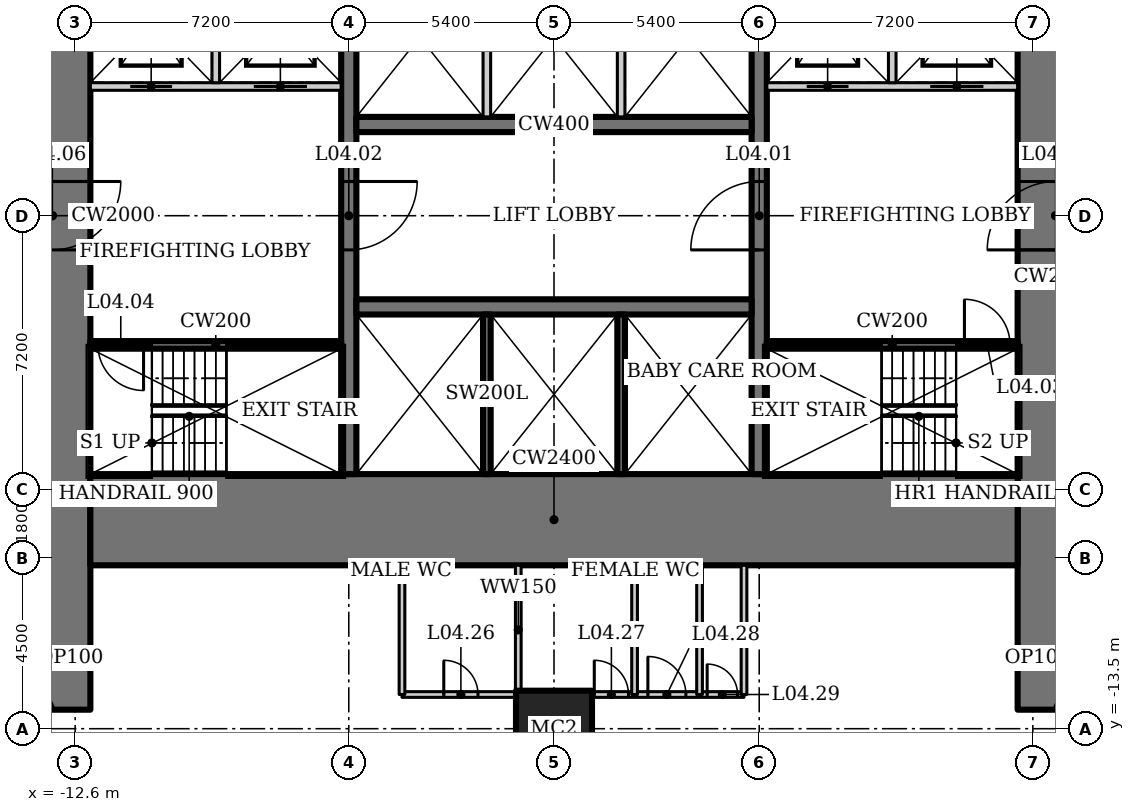
"""IFC4 building model, lengths in metres.
Left out: names, types, materials, properties, quantities, classifications, styles, units other than length and angle.
Written with IfcOpenShell. Run it as: python <this file> out.ifc"""

import sys

from ifc_helpers import new_model, si_unit, direction, frame, frame_2d, origin, origin_2d, place, context, subcontext, project, spatial, rectangle, hollow_rectangle, extrude, element, fill, save


model = new_model("IFC4")
c1 = context("Model", 3, precision=1e-05, world=origin(), true_north=direction((0.0, 1.0)))
c2 = subcontext(c1, "Body", "Model", "MODEL_VIEW")
j1 = project(units=[si_unit("LENGTHUNIT", "METRE"), si_unit("PLANEANGLEUNIT", "RADIAN")], contexts=[c1])
p1 = place(None, origin())
s1 = spatial("IfcSite", under=j1, at=p1, CompositionType="ELEMENT")
p2 = place(p1, origin())
s2 = spatial("IfcBuilding", under=s1, at=p2, CompositionType="ELEMENT")
p3 = place(p2, frame((0.0, 0.0, 27.0)))
s3 = spatial("IfcBuildingStorey", under=s2, at=p3, CompositionType="ELEMENT", Elevation=27.0)
p4 = place(p3, frame((0.0, -13.5, 0.0), z_axis=(0.0, 0.0, 1.0), x_axis=(1.0, 0.0, 0.0)))
e1 = element("IfcColumn", 1, at=p4, inside=s3, PredefinedType="COLUMN", context=c2, shape_type="SweptSolid", body=[
    extrude(hollow_rectangle(XDim=2.0, YDim=2.0, WallThickness=0.17, at=origin_2d()), origin(), (0.0, 0.0, 1.0), 5.0),
])
p5 = place(p3, frame((13.2, -13.0, 0.0), z_axis=(0.0, 0.0, 1.0), x_axis=(0.0, 1.0, 0.0)))
e2 = element("IfcWall", 2, at=p5, inside=s3, PredefinedType="SHEAR", context=c2, shape_type="SweptSolid", body=[
    extrude(rectangle(XDim=26.0, YDim=2.0, at=frame_2d((13.0, 0.0))), origin(), (0.0, 0.0, 1.0), 5.0),
])
p6 = place(p5, frame((12.1, 0.0, 0.0)))
e3 = element("IfcOpeningElement", 3, at=p6, cuts=e2, PredefinedType="OPENING", context=c2, shape_type="SweptSolid", body=[
    extrude(rectangle(XDim=1.8, YDim=2.1, at=frame_2d((0.9, 1.05))), frame((0.0, 1.01, 0.0), z_axis=(0.0, -1.0, 0.0), x_axis=(1.0, 0.0, 0.0)), (0.0, 0.0, 1.0), 2.02),
])
p7 = place(p3, frame((-13.2, 13.0, 0.0), z_axis=(0.0, 0.0, 1.0), x_axis=(0.0, -1.0, 0.0)))
e4 = element("IfcWall", 4, at=p7, inside=s3, PredefinedType="SHEAR", context=c2, shape_type="SweptSolid", body=[
    extrude(rectangle(XDim=26.0, YDim=2.0, at=frame_2d((13.0, 0.0))), origin(), (0.0, 0.0, 1.0), 5.0),
])
p8 = place(p7, frame((12.1, 0.0, 0.0)))
e5 = element("IfcOpeningElement", 5, at=p8, cuts=e4, PredefinedType="OPENING", context=c2, shape_type="SweptSolid", body=[
    extrude(rectangle(XDim=1.8, YDim=2.1, at=frame_2d((0.9, 1.05))), frame((0.0, 1.01, 0.0), z_axis=(0.0, -1.0, 0.0), x_axis=(1.0, 0.0, 0.0)), (0.0, 0.0, 1.0), 2.02),
])
p9 = place(p3, frame((-12.2, -8.0, 0.0), z_axis=(0.0, 0.0, 1.0), x_axis=(1.0, 0.0, 0.0)))
e6 = element("IfcWall", 6, at=p9, inside=s3, PredefinedType="SHEAR", context=c2, shape_type="SweptSolid", body=[
    extrude(rectangle(XDim=24.4, YDim=2.4, at=frame_2d((12.2, 0.0))), origin(), (0.0, 0.0, 1.0), 5.0),
])
p10 = place(p3, frame((5.4, -6.8, 0.0), z_axis=(0.0, 0.0, 1.0), x_axis=(0.0, 1.0, 0.0)))
e7 = element("IfcWall", 7, at=p10, inside=s3, PredefinedType="SHEAR", context=c2, shape_type="SweptSolid", body=[
    extrude(rectangle(XDim=13.6, YDim=0.4, at=frame_2d((6.8, 0.0))), origin(), (0.0, 0.0, 1.0), 5.0),
])
p11 = place(p10, frame((5.9, 0.0, 0.0)))
e8 = element("IfcOpeningElement", 8, at=p11, cuts=e7, PredefinedType="OPENING", context=c2, shape_type="SweptSolid", body=[
    extrude(rectangle(XDim=1.8, YDim=2.1, at=frame_2d((0.9, 1.05))), frame((0.0, 0.21, 0.0), z_axis=(0.0, -1.0, 0.0), x_axis=(1.0, 0.0, 0.0)), (0.0, 0.0, 1.0), 0.42),
])
p12 = place(p3, frame((-5.4, 6.8, 0.0), z_axis=(0.0, 0.0, 1.0), x_axis=(0.0, -1.0, 0.0)))
e9 = element("IfcWall", 9, at=p12, inside=s3, PredefinedType="SHEAR", context=c2, shape_type="SweptSolid", body=[
    extrude(rectangle(XDim=13.6, YDim=0.4, at=frame_2d((6.8, 0.0))), origin(), (0.0, 0.0, 1.0), 5.0),
])
p13 = place(p12, frame((5.9, 0.0, 0.0)))
e10 = element("IfcOpeningElement", 10, at=p13, cuts=e9, PredefinedType="OPENING", context=c2, shape_type="SweptSolid", body=[
    extrude(rectangle(XDim=1.8, YDim=2.1, at=frame_2d((0.9, 1.05))), frame((0.0, 0.21, 0.0), z_axis=(0.0, -1.0, 0.0), x_axis=(1.0, 0.0, 0.0)), (0.0, 0.0, 1.0), 0.42),
])
p14 = place(p3, frame((-5.2, -2.4, 0.0), z_axis=(0.0, 0.0, 1.0), x_axis=(1.0, 0.0, 0.0)))
e11 = element("IfcWall", 11, at=p14, inside=s3, PredefinedType="SHEAR", context=c2, shape_type="SweptSolid", body=[
    extrude(rectangle(XDim=10.4, YDim=0.4, at=frame_2d((5.2, 0.0))), origin(), (0.0, 0.0, 1.0), 5.0),
])
for number, where, z_axis, x_axis in (
    (12, (-1.767, -2.6, 0.0), (0.0, 0.0, 1.0), (0.0, -1.0, 0.0)),
    (13, (1.767, -2.6, 0.0), (0.0, 0.0, 1.0), (0.0, -1.0, 0.0)),
):
    element("IfcWall", number, at=place(p3, frame(where, z_axis=z_axis, x_axis=x_axis)), inside=s3, PredefinedType="SOLIDWALL", context=c2, shape_type="SweptSolid", body=[
        extrude(rectangle(XDim=4.2, YDim=0.2, at=frame_2d((2.1, 0.0))), origin(), (0.0, 0.0, 1.0), 5.0),
    ])
p15 = place(p3, frame((5.2, 2.4, 0.0), z_axis=(0.0, 0.0, 1.0), x_axis=(-1.0, 0.0, 0.0)))
e14 = element("IfcWall", 14, at=p15, inside=s3, PredefinedType="SHEAR", context=c2, shape_type="SweptSolid", body=[
    extrude(rectangle(XDim=10.4, YDim=0.4, at=frame_2d((5.2, 0.0))), origin(), (0.0, 0.0, 1.0), 5.0),
])
for number, where, z_axis, x_axis in (
    (15, (-1.767, 2.6, 0.0), (0.0, 0.0, 1.0), (0.0, 1.0, 0.0)),
    (16, (1.767, 2.6, 0.0), (0.0, 0.0, 1.0), (0.0, 1.0, 0.0)),
):
    element("IfcWall", number, at=place(p3, frame(where, z_axis=z_axis, x_axis=x_axis)), inside=s3, PredefinedType="SOLIDWALL", context=c2, shape_type="SweptSolid", body=[
        extrude(rectangle(XDim=4.2, YDim=0.2, at=frame_2d((2.1, 0.0))), origin(), (0.0, 0.0, 1.0), 5.0),
    ])
p16 = place(p3, frame((5.6, -3.4, 0.0), z_axis=(0.0, 0.0, 1.0), x_axis=(1.0, 0.0, 0.0)))
e17 = element("IfcWall", 17, at=p16, inside=s3, PredefinedType="SHEAR", context=c2, shape_type="SweptSolid", body=[
    extrude(rectangle(XDim=6.6, YDim=0.2, at=frame_2d((3.3, 0.0))), origin(), (0.0, 0.0, 1.0), 5.0),
])
p17 = place(p16, frame((5.2, 0.0, 0.0)))
e18 = element("IfcOpeningElement", 18, at=p17, cuts=e17, PredefinedType="OPENING", context=c2, shape_type="SweptSolid", body=[
    extrude(rectangle(XDim=1.2, YDim=2.1, at=frame_2d((0.6, 1.05))), frame((0.0, 0.11, 0.0), z_axis=(0.0, -1.0, 0.0), x_axis=(1.0, 0.0, 0.0)), (0.0, 0.0, 1.0), 0.22),
])
p18 = place(p3, frame((12.2, 3.4, 0.0), z_axis=(0.0, 0.0, 1.0), x_axis=(-1.0, 0.0, 0.0)))
e19 = element("IfcWall", 19, at=p18, inside=s3, PredefinedType="SOLIDWALL", context=c2, shape_type="SweptSolid", body=[
    extrude(rectangle(XDim=6.6, YDim=0.2, at=frame_2d((3.3, 0.0))), origin(), (0.0, 0.0, 1.0), 5.0),
])
p19 = place(p18, frame((4.45, 0.0, 0.0)))
e20 = element("IfcOpeningElement", 20, at=p19, cuts=e19, PredefinedType="OPENING", context=c2, shape_type="SweptSolid", body=[
    extrude(rectangle(XDim=1.1, YDim=2.2, at=frame_2d((0.55, 1.1))), frame((0.0, 0.11, 0.0), z_axis=(0.0, -1.0, 0.0), x_axis=(1.0, 0.0, 0.0)), (0.0, 0.0, 1.0), 0.22),
])
p20 = place(p18, frame((0.9, 0.0, 0.0)))
e21 = element("IfcOpeningElement", 21, at=p20, cuts=e19, PredefinedType="OPENING", context=c2, shape_type="SweptSolid", body=[
    extrude(rectangle(XDim=1.4, YDim=2.2, at=frame_2d((0.7, 1.1))), frame((0.0, 0.11, 0.0), z_axis=(0.0, -1.0, 0.0), x_axis=(1.0, 0.0, 0.0)), (0.0, 0.0, 1.0), 0.22),
])
p21 = place(p3, frame((8.9, 3.5, 0.0), z_axis=(0.0, 0.0, 1.0), x_axis=(0.0, 1.0, 0.0)))
e22 = element("IfcWall", 22, at=p21, inside=s3, PredefinedType="SOLIDWALL", context=c2, shape_type="SweptSolid", body=[
    extrude(rectangle(XDim=3.3, YDim=0.2, at=frame_2d((1.65, 0.0))), origin(), (0.0, 0.0, 1.0), 5.0),
])
p22 = place(p3, frame((-5.6, -3.4, 0.0), z_axis=(0.0, 0.0, 1.0), x_axis=(-1.0, 0.0, 0.0)))
e23 = element("IfcWall", 23, at=p22, inside=s3, PredefinedType="SHEAR", context=c2, shape_type="SweptSolid", body=[
    extrude(rectangle(XDim=6.6, YDim=0.2, at=frame_2d((3.3, 0.0))), origin(), (0.0, 0.0, 1.0), 5.0),
])
p23 = place(p22, frame((5.2, 0.0, 0.0)))
e24 = element("IfcOpeningElement", 24, at=p23, cuts=e23, PredefinedType="OPENING", context=c2, shape_type="SweptSolid", body=[
    extrude(rectangle(XDim=1.2, YDim=2.1, at=frame_2d((0.6, 1.05))), frame((0.0, 0.11, 0.0), z_axis=(0.0, -1.0, 0.0), x_axis=(1.0, 0.0, 0.0)), (0.0, 0.0, 1.0), 0.22),
])
p24 = place(p3, frame((-12.2, 3.4, 0.0), z_axis=(0.0, 0.0, 1.0), x_axis=(1.0, 0.0, 0.0)))
e25 = element("IfcWall", 25, at=p24, inside=s3, PredefinedType="SOLIDWALL", context=c2, shape_type="SweptSolid", body=[
    extrude(rectangle(XDim=6.6, YDim=0.2, at=frame_2d((3.3, 0.0))), origin(), (0.0, 0.0, 1.0), 5.0),
])
p25 = place(p24, frame((1.05, 0.0, 0.0)))
e26 = element("IfcOpeningElement", 26, at=p25, cuts=e25, PredefinedType="OPENING", context=c2, shape_type="SweptSolid", body=[
    extrude(rectangle(XDim=1.1, YDim=2.2, at=frame_2d((0.55, 1.1))), frame((0.0, 0.11, 0.0), z_axis=(0.0, -1.0, 0.0), x_axis=(1.0, 0.0, 0.0)), (0.0, 0.0, 1.0), 0.22),
])
p26 = place(p24, frame((4.3, 0.0, 0.0)))
e27 = element("IfcOpeningElement", 27, at=p26, cuts=e25, PredefinedType="OPENING", context=c2, shape_type="SweptSolid", body=[
    extrude(rectangle(XDim=1.4, YDim=2.2, at=frame_2d((0.7, 1.1))), frame((0.0, 0.11, 0.0), z_axis=(0.0, -1.0, 0.0), x_axis=(1.0, 0.0, 0.0)), (0.0, 0.0, 1.0), 0.22),
])
p27 = place(p3, frame((-8.9, 3.5, 0.0), z_axis=(0.0, 0.0, 1.0), x_axis=(0.0, 1.0, 0.0)))
e28 = element("IfcWall", 28, at=p27, inside=s3, PredefinedType="SOLIDWALL", context=c2, shape_type="SweptSolid", body=[
    extrude(rectangle(XDim=3.3, YDim=0.2, at=frame_2d((1.65, 0.0))), origin(), (0.0, 0.0, 1.0), 5.0),
])
p28 = place(p3, frame((-4.0, -12.6, 0.0), z_axis=(0.0, 0.0, 1.0), x_axis=(1.0, 0.0, 0.0)))
e29 = element("IfcWall", 29, at=p28, inside=s3, PredefinedType="SOLIDWALL", context=c2, shape_type="SweptSolid", body=[
    extrude(rectangle(XDim=9.0, YDim=0.15, at=frame_2d((4.5, 0.0))), origin(), (0.0, 0.0, 1.0), 4.8),
])
p29 = place(p28, frame((1.1, 0.0, 0.0)))
e30 = element("IfcOpeningElement", 30, at=p29, cuts=e29, PredefinedType="OPENING", context=c2, shape_type="SweptSolid", body=[
    extrude(rectangle(XDim=0.9, YDim=2.1, at=frame_2d((0.45, 1.05))), frame((0.0, 0.085, 0.0), z_axis=(0.0, -1.0, 0.0), x_axis=(1.0, 0.0, 0.0)), (0.0, 0.0, 1.0), 0.17),
])
p30 = place(p28, frame((5.06, 0.0, 0.0)))
e31 = element("IfcOpeningElement", 31, at=p30, cuts=e29, PredefinedType="OPENING", context=c2, shape_type="SweptSolid", body=[
    extrude(rectangle(XDim=0.9, YDim=2.1, at=frame_2d((0.45, 1.05))), frame((0.0, 0.085, 0.0), z_axis=(0.0, -1.0, 0.0), x_axis=(1.0, 0.0, 0.0)), (0.0, 0.0, 1.0), 0.17),
])
p31 = place(p28, frame((6.47, 0.0, 0.0)))
e32 = element("IfcOpeningElement", 32, at=p31, cuts=e29, PredefinedType="OPENING", context=c2, shape_type="SweptSolid", body=[
    extrude(rectangle(XDim=1.0, YDim=2.1, at=frame_2d((0.5, 1.05))), frame((0.0, 0.085, 0.0), z_axis=(0.0, -1.0, 0.0), x_axis=(1.0, 0.0, 0.0)), (0.0, 0.0, 1.0), 0.17),
])
p32 = place(p28, frame((8.03, 0.0, 0.0)))
e33 = element("IfcOpeningElement", 33, at=p32, cuts=e29, PredefinedType="OPENING", context=c2, shape_type="SweptSolid", body=[
    extrude(rectangle(XDim=0.8, YDim=2.1, at=frame_2d((0.4, 1.05))), frame((0.0, 0.085, 0.0), z_axis=(0.0, -1.0, 0.0), x_axis=(1.0, 0.0, 0.0)), (0.0, 0.0, 1.0), 0.17),
])
for number, where, z_axis, x_axis in (
    (34, (-4.0, -9.2, 0.0), (0.0, 0.0, 1.0), (0.0, -1.0, 0.0)),
    (35, (5.0, -9.2, 0.0), (0.0, 0.0, 1.0), (0.0, -1.0, 0.0)),
    (36, (-0.94, -9.2, 0.0), (0.0, 0.0, 1.0), (0.0, -1.0, 0.0)),
):
    element("IfcWall", number, at=place(p3, frame(where, z_axis=z_axis, x_axis=x_axis)), inside=s3, PredefinedType="SOLIDWALL", context=c2, shape_type="SweptSolid", body=[
        extrude(rectangle(XDim=3.4, YDim=0.15, at=frame_2d((1.7, 0.0))), origin(), (0.0, 0.0, 1.0), 4.8),
    ])
p33 = place(p3, frame((2.12, -9.2, 0.0), z_axis=(0.0, 0.0, 1.0), x_axis=(0.0, -1.0, 0.0)))
e37 = element("IfcWall", 37, at=p33, inside=s3, PredefinedType="SOLIDWALL", context=c2, shape_type="SweptSolid", body=[
    extrude(rectangle(XDim=3.4, YDim=0.15, at=frame_2d((1.7, 0.0))), origin(), (0.0, 0.0, 1.0), 4.03),
])
p34 = place(p3, frame((3.83, -9.2, 0.0), z_axis=(0.0, 0.0, 1.0), x_axis=(0.0, -1.0, 0.0)))
e38 = element("IfcWall", 38, at=p34, inside=s3, PredefinedType="SOLIDWALL", context=c2, shape_type="SweptSolid", body=[
    extrude(rectangle(XDim=3.4, YDim=0.15, at=frame_2d((1.7, 0.0))), origin(), (0.0, 0.0, 1.0), 4.8),
])
for number, where, z_axis, x_axis in (
    (39, (13.2, -13.0, 0.0), (0.0, 0.0, 1.0), (0.42, 0.907, 0.0)),
    (40, (-13.2, -13.0, 0.0), (0.0, 0.0, 1.0), (-0.42, 0.907, 0.0)),
):
    element("IfcWall", number, at=place(p3, frame(where, z_axis=z_axis, x_axis=x_axis)), inside=s3, PredefinedType="PARTITIONING", context=c2, shape_type="SweptSolid", body=[
        extrude(rectangle(XDim=2.975, YDim=0.1, at=frame_2d((1.488, 0.0))), origin(), (0.0, 0.0, 1.0), 4.8),
    ])
p35 = place(p11, origin())
e41 = element("IfcDoor", 41, at=p35, inside=s3, OperationType="DOUBLE_DOOR_DOUBLE_SWING", PredefinedType="DOOR", context=c2, shape_type="SweptSolid", body=[
    extrude(rectangle(XDim=1.8, YDim=2.1, at=frame_2d((0.9, 1.05))), frame((0.0, 0.025, 0.0), z_axis=(0.0, -1.0, 0.0), x_axis=(1.0, 0.0, 0.0)), (0.0, 0.0, 1.0), 0.05),
])
fill(e8, e41)
p36 = place(p13, origin())
e42 = element("IfcDoor", 42, at=p36, inside=s3, OperationType="DOUBLE_DOOR_DOUBLE_SWING", PredefinedType="DOOR", context=c2, shape_type="SweptSolid", body=[
    extrude(rectangle(XDim=1.8, YDim=2.1, at=frame_2d((0.9, 1.05))), frame((0.0, 0.025, 0.0), z_axis=(0.0, -1.0, 0.0), x_axis=(1.0, 0.0, 0.0)), (0.0, 0.0, 1.0), 0.05),
])
fill(e10, e42)
p37 = place(p17, origin())
e43 = element("IfcDoor", 43, at=p37, inside=s3, OperationType="SINGLE_SWING_RIGHT", PredefinedType="DOOR", context=c2, shape_type="SweptSolid", body=[
    extrude(rectangle(XDim=1.2, YDim=2.1, at=frame_2d((0.6, 1.05))), frame((0.0, 0.025, 0.0), z_axis=(0.0, -1.0, 0.0), x_axis=(1.0, 0.0, 0.0)), (0.0, 0.0, 1.0), 0.05),
])
fill(e18, e43)
p38 = place(p23, origin())
e44 = element("IfcDoor", 44, at=p38, inside=s3, OperationType="SINGLE_SWING_RIGHT", PredefinedType="DOOR", context=c2, shape_type="SweptSolid", body=[
    extrude(rectangle(XDim=1.2, YDim=2.1, at=frame_2d((0.6, 1.05))), frame((0.0, 0.025, 0.0), z_axis=(0.0, -1.0, 0.0), x_axis=(1.0, 0.0, 0.0)), (0.0, 0.0, 1.0), 0.05),
])
fill(e24, e44)
p39 = place(p6, origin())
e45 = element("IfcDoor", 45, at=p39, inside=s3, OperationType="DOUBLE_DOOR_DOUBLE_SWING", PredefinedType="DOOR", context=c2, shape_type="SweptSolid", body=[
    extrude(rectangle(XDim=1.8, YDim=2.1, at=frame_2d((0.9, 1.05))), frame((0.0, 0.025, 0.0), z_axis=(0.0, -1.0, 0.0), x_axis=(1.0, 0.0, 0.0)), (0.0, 0.0, 1.0), 0.05),
])
fill(e3, e45)
p40 = place(p8, origin())
e46 = element("IfcDoor", 46, at=p40, inside=s3, OperationType="DOUBLE_DOOR_DOUBLE_SWING", PredefinedType="DOOR", context=c2, shape_type="SweptSolid", body=[
    extrude(rectangle(XDim=1.8, YDim=2.1, at=frame_2d((0.9, 1.05))), frame((0.0, 0.025, 0.0), z_axis=(0.0, -1.0, 0.0), x_axis=(1.0, 0.0, 0.0)), (0.0, 0.0, 1.0), 0.05),
])
fill(e5, e46)
p41 = place(p25, origin())
e47 = element("IfcDoor", 47, at=p41, inside=s3, OperationType="DOUBLE_DOOR_SLIDING", PredefinedType="DOOR", context=c2, shape_type="SweptSolid", body=[
    extrude(rectangle(XDim=1.1, YDim=2.2, at=frame_2d((0.55, 1.1))), frame((0.0, 0.025, 0.0), z_axis=(0.0, -1.0, 0.0), x_axis=(1.0, 0.0, 0.0)), (0.0, 0.0, 1.0), 0.05),
])
fill(e26, e47)
p42 = place(p26, origin())
e48 = element("IfcDoor", 48, at=p42, inside=s3, OperationType="DOUBLE_DOOR_SLIDING", PredefinedType="DOOR", context=c2, shape_type="SweptSolid", body=[
    extrude(rectangle(XDim=1.4, YDim=2.2, at=frame_2d((0.7, 1.1))), frame((0.0, 0.025, 0.0), z_axis=(0.0, -1.0, 0.0), x_axis=(1.0, 0.0, 0.0)), (0.0, 0.0, 1.0), 0.05),
])
fill(e27, e48)
p43 = place(p19, origin())
e49 = element("IfcDoor", 49, at=p43, inside=s3, OperationType="DOUBLE_DOOR_SLIDING", PredefinedType="DOOR", context=c2, shape_type="SweptSolid", body=[
    extrude(rectangle(XDim=1.1, YDim=2.2, at=frame_2d((0.55, 1.1))), frame((0.0, 0.025, 0.0), z_axis=(0.0, -1.0, 0.0), x_axis=(1.0, 0.0, 0.0)), (0.0, 0.0, 1.0), 0.05),
])
fill(e20, e49)
p44 = place(p20, origin())
e50 = element("IfcDoor", 50, at=p44, inside=s3, OperationType="DOUBLE_DOOR_SLIDING", PredefinedType="DOOR", context=c2, shape_type="SweptSolid", body=[
    extrude(rectangle(XDim=1.4, YDim=2.2, at=frame_2d((0.7, 1.1))), frame((0.0, 0.025, 0.0), z_axis=(0.0, -1.0, 0.0), x_axis=(1.0, 0.0, 0.0)), (0.0, 0.0, 1.0), 0.05),
])
fill(e21, e50)
p45 = place(p29, origin())
e51 = element("IfcDoor", 51, at=p45, inside=s3, OperationType="SINGLE_SWING_LEFT", PredefinedType="DOOR", context=c2, shape_type="SweptSolid", body=[
    extrude(rectangle(XDim=0.9, YDim=2.1, at=frame_2d((0.45, 1.05))), frame((0.0, 0.025, 0.0), z_axis=(0.0, -1.0, 0.0), x_axis=(1.0, 0.0, 0.0)), (0.0, 0.0, 1.0), 0.05),
])
fill(e30, e51)
p46 = place(p30, origin())
e52 = element("IfcDoor", 52, at=p46, inside=s3, OperationType="SINGLE_SWING_LEFT", PredefinedType="DOOR", context=c2, shape_type="SweptSolid", body=[
    extrude(rectangle(XDim=0.9, YDim=2.1, at=frame_2d((0.45, 1.05))), frame((0.0, 0.025, 0.0), z_axis=(0.0, -1.0, 0.0), x_axis=(1.0, 0.0, 0.0)), (0.0, 0.0, 1.0), 0.05),
])
fill(e31, e52)
p47 = place(p31, origin())
e53 = element("IfcDoor", 53, at=p47, inside=s3, OperationType="SINGLE_SWING_LEFT", PredefinedType="DOOR", context=c2, shape_type="SweptSolid", body=[
    extrude(rectangle(XDim=1.0, YDim=2.1, at=frame_2d((0.5, 1.05))), frame((0.0, 0.025, 0.0), z_axis=(0.0, -1.0, 0.0), x_axis=(1.0, 0.0, 0.0)), (0.0, 0.0, 1.0), 0.05),
])
fill(e32, e53)
p48 = place(p32, origin())
e54 = element("IfcDoor", 54, at=p48, inside=s3, OperationType="SINGLE_SWING_LEFT", PredefinedType="DOOR", context=c2, shape_type="SweptSolid", body=[
    extrude(rectangle(XDim=0.8, YDim=2.1, at=frame_2d((0.4, 1.05))), frame((0.0, 0.025, 0.0), z_axis=(0.0, -1.0, 0.0), x_axis=(1.0, 0.0, 0.0)), (0.0, 0.0, 1.0), 0.05),
])
fill(e33, e54)
save(model, sys.argv[1])
